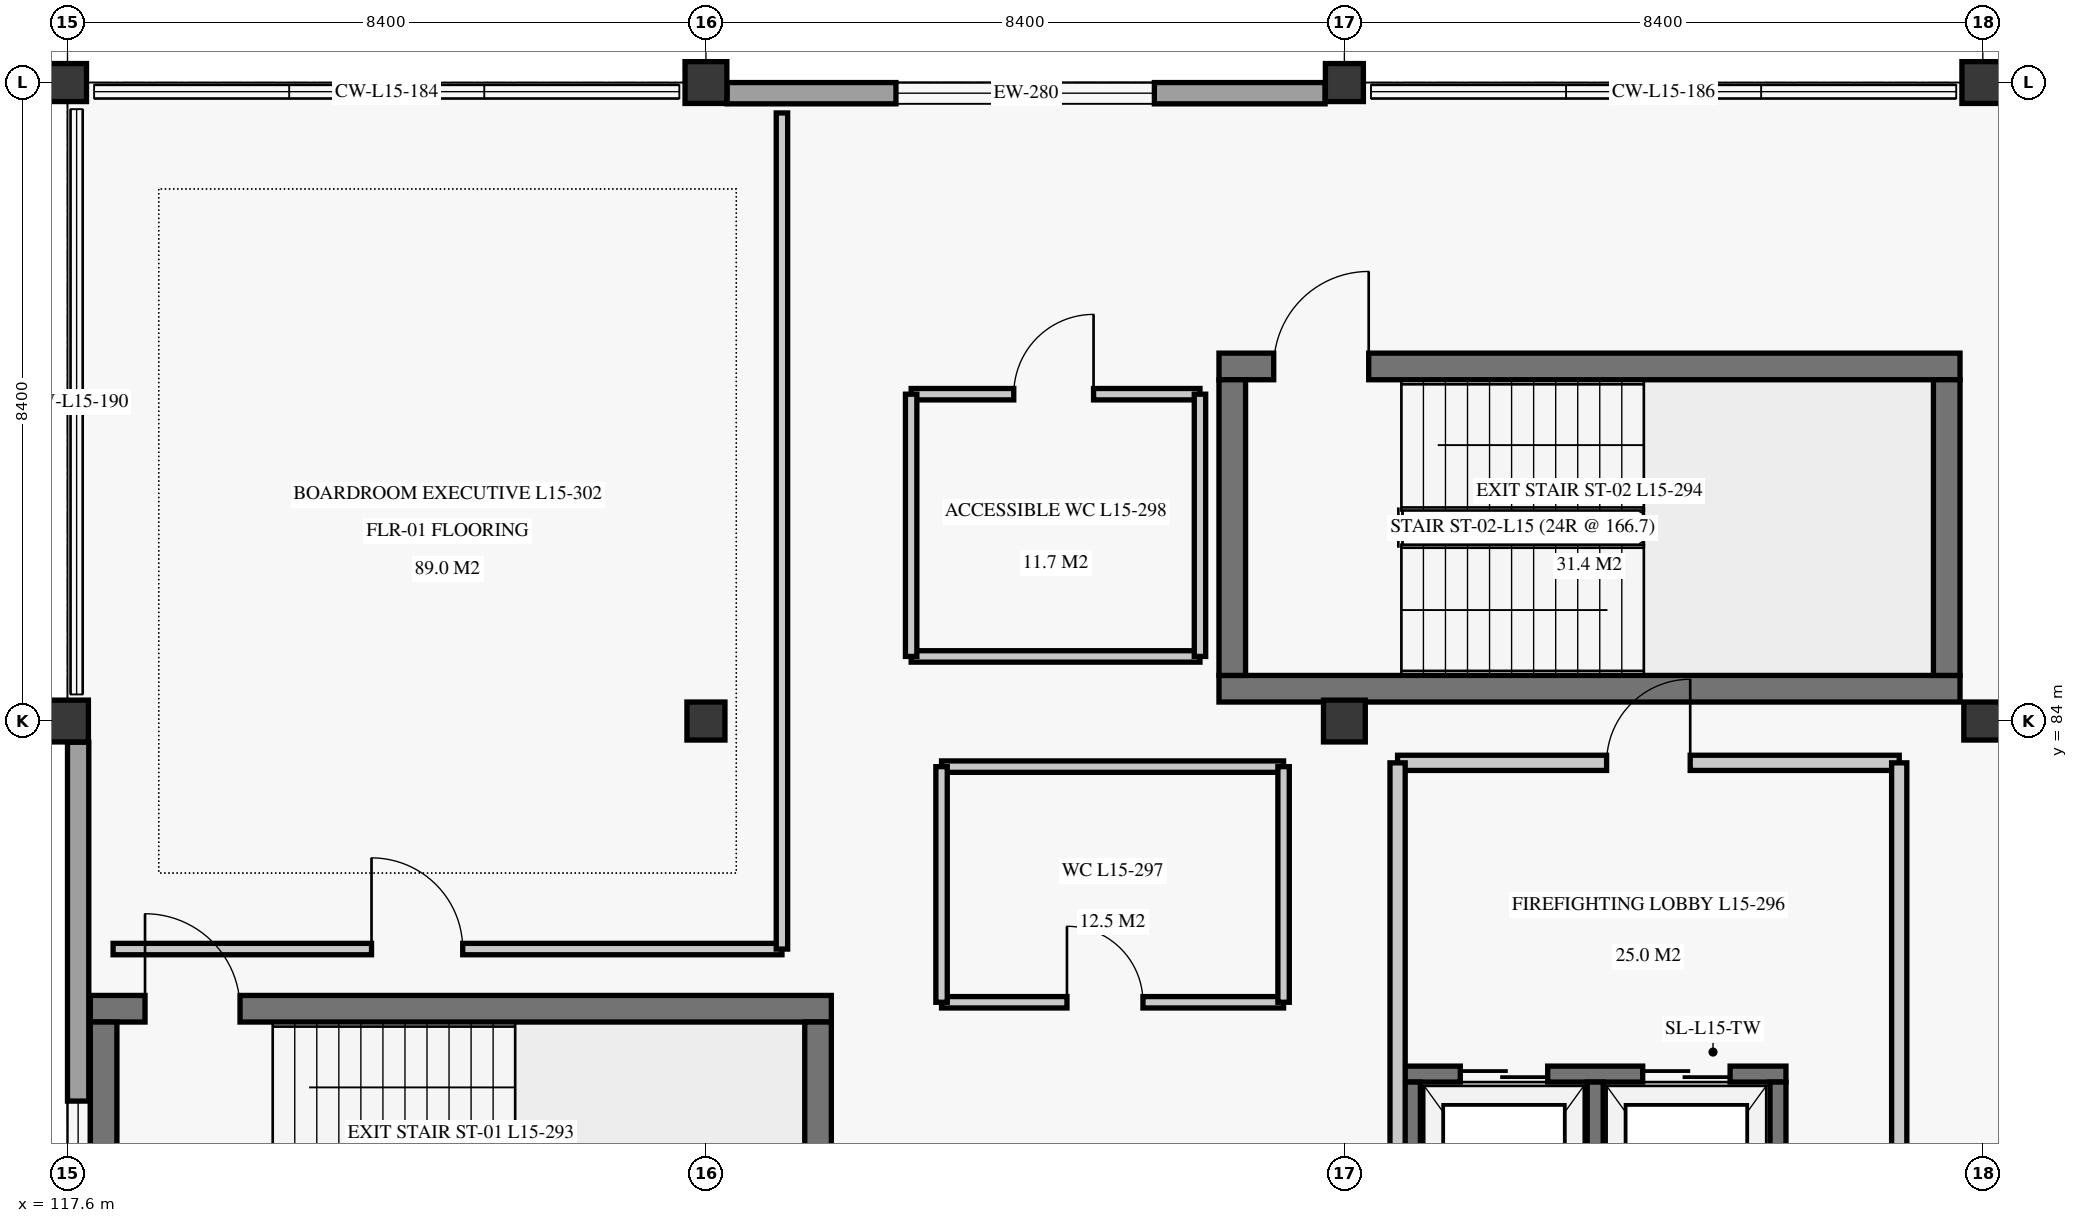
"""IFC4 building model, lengths in metres.
Left out: names, types, materials, properties, quantities, classifications, styles, units other than length and angle.
Written with IfcOpenShell. Run it as: python <this file> out.ifc"""

import sys

from ifc_helpers import new_model, si_unit, direction, frame, frame_2d, origin, origin_2d, place, context, subcontext, project, spatial, rectangle, extrude, element, fill, save


model = new_model("IFC4")
c1 = context("Model", 3, precision=1e-05, world=origin(), true_north=direction((0.0, 1.0)))
c2 = subcontext(c1, "Body", "Model", "MODEL_VIEW")
j1 = project(units=[si_unit("LENGTHUNIT", "METRE"), si_unit("PLANEANGLEUNIT", "RADIAN")], contexts=[c1])
p1 = place(None, origin())
s1 = spatial("IfcSite", under=j1, at=p1, CompositionType="ELEMENT")
p2 = place(p1, origin())
s2 = spatial("IfcBuilding", under=s1, at=p2, CompositionType="ELEMENT")
p3 = place(p2, frame((0.0, 0.0, 62.7)))
s3 = spatial("IfcBuildingStorey", under=s2, at=p3, CompositionType="ELEMENT", Elevation=62.7)
p4 = place(p3, frame((117.6, 84.0, 0.0), z_axis=(0.0, 0.0, 1.0), x_axis=(1.0, 0.0, 0.0)))
e1 = element("IfcColumn", 1, at=p4, inside=s3, PredefinedType="COLUMN", context=c2, shape_type="SweptSolid", body=[
    extrude(rectangle(XDim=0.55, YDim=0.55, at=origin_2d()), origin(), (0.0, 0.0, 1.0), 3.72),
])
for number, where, z_axis, x_axis in (
    (2, (117.6, 92.4, 0.0), (0.0, 0.0, 1.0), (1.0, 0.0, 0.0)),
    (3, (126.0, 84.0, 0.0), (0.0, 0.0, 1.0), (1.0, 0.0, 0.0)),
):
    element("IfcColumn", number, at=place(p3, frame(where, z_axis=z_axis, x_axis=x_axis)), inside=s3, PredefinedType="COLUMN", context=c2, shape_type="SweptSolid", body=[
        extrude(rectangle(XDim=0.5, YDim=0.5, at=origin_2d()), origin(), (0.0, 0.0, 1.0), 3.72),
    ])
for number, where, z_axis, x_axis in (
    (4, (126.0, 92.4, 0.0), (0.0, 0.0, 1.0), (1.0, 0.0, 0.0)),
    (5, (134.4, 84.0, 0.0), (0.0, 0.0, 1.0), (1.0, 0.0, 0.0)),
):
    element("IfcColumn", number, at=place(p3, frame(where, z_axis=z_axis, x_axis=x_axis)), inside=s3, PredefinedType="COLUMN", context=c2, shape_type="SweptSolid", body=[
        extrude(rectangle(XDim=0.55, YDim=0.55, at=origin_2d()), origin(), (0.0, 0.0, 1.0), 3.72),
    ])
for number, where, z_axis, x_axis in (
    (6, (134.4, 92.4, 0.0), (0.0, 0.0, 1.0), (1.0, 0.0, 0.0)),
    (7, (142.8, 84.0, 0.0), (0.0, 0.0, 1.0), (1.0, 0.0, 0.0)),
):
    element("IfcColumn", number, at=place(p3, frame(where, z_axis=z_axis, x_axis=x_axis)), inside=s3, PredefinedType="COLUMN", context=c2, shape_type="SweptSolid", body=[
        extrude(rectangle(XDim=0.5, YDim=0.5, at=origin_2d()), origin(), (0.0, 0.0, 1.0), 3.72),
    ])
p5 = place(p3, frame((142.8, 92.4, 0.0), z_axis=(0.0, 0.0, 1.0), x_axis=(1.0, 0.0, 0.0)))
e8 = element("IfcColumn", 8, at=p5, inside=s3, PredefinedType="COLUMN", context=c2, shape_type="SweptSolid", body=[
    extrude(rectangle(XDim=0.55, YDim=0.55, at=origin_2d()), origin(), (0.0, 0.0, 1.0), 3.72),
])
p6 = place(p3, frame((126.278, 92.26, 0.0), z_axis=(0.0, 0.0, 1.0), x_axis=(1.0, 0.0, 0.0)))
e9 = element("IfcWall", 9, at=p6, inside=s3, PredefinedType="SOLIDWALL", context=c2, shape_type="SweptSolid", body=[
    extrude(rectangle(XDim=7.868, YDim=0.28, at=frame_2d((3.934, 0.0))), origin(), (0.0, 0.0, 1.0), 3.04),
])
p7 = place(p6, frame((2.222, 0.0, 0.85)))
e10 = element("IfcOpeningElement", 10, at=p7, cuts=e9, PredefinedType="OPENING", context=c2, shape_type="SweptSolid", body=[
    extrude(rectangle(XDim=3.4, YDim=1.9, at=frame_2d((1.7, 0.95))), frame((0.0, 0.15, 0.0), z_axis=(0.0, -1.0, 0.0), x_axis=(1.0, 0.0, 0.0)), (0.0, 0.0, 1.0), 0.3),
])
p8 = place(p3, frame((117.74, 75.852, 0.0), z_axis=(0.0, 0.0, 1.0), x_axis=(0.0, 1.0, 0.0)))
e11 = element("IfcWall", 11, at=p8, inside=s3, PredefinedType="SOLIDWALL", context=c2, shape_type="SweptSolid", body=[
    extrude(rectangle(XDim=7.87, YDim=0.28, at=frame_2d((3.935, 0.0))), origin(), (0.0, 0.0, 1.0), 3.04),
])
p9 = place(p8, frame((0.948, 0.0, 0.85)))
e12 = element("IfcOpeningElement", 12, at=p9, cuts=e11, PredefinedType="OPENING", context=c2, shape_type="SweptSolid", body=[
    extrude(rectangle(XDim=2.2, YDim=1.8, at=frame_2d((1.1, 0.9))), frame((0.0, 0.15, 0.0), z_axis=(0.0, -1.0, 0.0), x_axis=(1.0, 0.0, 0.0)), (0.0, 0.0, 1.0), 0.3),
])
p10 = place(p3, frame((117.9, 80.215, 0.0), z_axis=(0.0, 0.0, 1.0), x_axis=(1.0, 0.0, 0.0)))
e13 = element("IfcWall", 13, at=p10, inside=s3, PredefinedType="SHEAR", context=c2, shape_type="SweptSolid", body=[
    extrude(rectangle(XDim=9.75, YDim=0.35, at=frame_2d((4.875, 0.0))), origin(), (0.0, 0.0, 1.0), 3.72),
])
p11 = place(p10, frame((0.72, 0.0, 0.0)))
e14 = element("IfcOpeningElement", 14, at=p11, cuts=e13, PredefinedType="OPENING", context=c2, shape_type="SweptSolid", body=[
    extrude(rectangle(XDim=1.25, YDim=2.2, at=frame_2d((0.625, 1.1))), frame((0.0, 0.185, 0.0), z_axis=(0.0, -1.0, 0.0), x_axis=(1.0, 0.0, 0.0)), (0.0, 0.0, 1.0), 0.37),
])
for number, where, z_axis, x_axis in (
    (15, (118.075, 76.15, 0.0), (0.0, 0.0, 1.0), (0.0, 1.0, 0.0)),
    (16, (127.475, 76.15, 0.0), (0.0, 0.0, 1.0), (0.0, 1.0, 0.0)),
):
    element("IfcWall", number, at=place(p3, frame(where, z_axis=z_axis, x_axis=x_axis)), inside=s3, PredefinedType="SHEAR", context=c2, shape_type="SweptSolid", body=[
        extrude(rectangle(XDim=3.89, YDim=0.35, at=frame_2d((1.945, 0.0))), origin(), (0.0, 0.0, 1.0), 3.72),
    ])
p12 = place(p3, frame((132.75, 84.425, 0.0), z_axis=(0.0, 0.0, 1.0), x_axis=(1.0, 0.0, 0.0)))
e17 = element("IfcWall", 17, at=p12, inside=s3, PredefinedType="SHEAR", context=c2, shape_type="SweptSolid", body=[
    extrude(rectangle(XDim=9.75, YDim=0.35, at=frame_2d((4.875, 0.0))), origin(), (0.0, 0.0, 1.0), 3.72),
])
p13 = place(p3, frame((132.75, 88.665, 0.0), z_axis=(0.0, 0.0, 1.0), x_axis=(1.0, 0.0, 0.0)))
e18 = element("IfcWall", 18, at=p13, inside=s3, PredefinedType="SHEAR", context=c2, shape_type="SweptSolid", body=[
    extrude(rectangle(XDim=9.75, YDim=0.35, at=frame_2d((4.875, 0.0))), origin(), (0.0, 0.0, 1.0), 3.72),
])
p14 = place(p13, frame((0.72, 0.0, 0.0)))
e19 = element("IfcOpeningElement", 19, at=p14, cuts=e18, PredefinedType="OPENING", context=c2, shape_type="SweptSolid", body=[
    extrude(rectangle(XDim=1.25, YDim=2.2, at=frame_2d((0.625, 1.1))), frame((0.0, 0.185, 0.0), z_axis=(0.0, -1.0, 0.0), x_axis=(1.0, 0.0, 0.0)), (0.0, 0.0, 1.0), 0.37),
])
for number, where, z_axis, x_axis in (
    (20, (132.925, 84.6, 0.0), (0.0, 0.0, 1.0), (0.0, 1.0, 0.0)),
    (21, (142.325, 84.6, 0.0), (0.0, 0.0, 1.0), (0.0, 1.0, 0.0)),
):
    element("IfcWall", number, at=place(p3, frame(where, z_axis=z_axis, x_axis=x_axis)), inside=s3, PredefinedType="SHEAR", context=c2, shape_type="SweptSolid", body=[
        extrude(rectangle(XDim=3.89, YDim=0.35, at=frame_2d((1.945, 0.0))), origin(), (0.0, 0.0, 1.0), 3.72),
    ])
p15 = place(p3, frame((135.19, 79.355, 0.0), z_axis=(0.0, 0.0, 1.0), x_axis=(1.0, 0.0, 0.0)))
e22 = element("IfcWall", 22, at=p15, inside=s3, PredefinedType="SHEAR", context=c2, shape_type="SweptSolid", body=[
    extrude(rectangle(XDim=5.02, YDim=0.21, at=frame_2d((2.51, 0.0))), origin(), (0.0, 0.0, 1.0), 3.72),
])
p16 = place(p15, frame((0.735, 0.0, 0.0)))
e23 = element("IfcOpeningElement", 23, at=p16, cuts=e22, PredefinedType="OPENING", context=c2, shape_type="SweptSolid", body=[
    extrude(rectangle(XDim=1.15, YDim=2.2, at=frame_2d((0.575, 1.1))), frame((0.0, 0.115, 0.0), z_axis=(0.0, -1.0, 0.0), x_axis=(1.0, 0.0, 0.0)), (0.0, 0.0, 1.0), 0.23),
])
p17 = place(p15, frame((3.135, 0.0, 0.0)))
e24 = element("IfcOpeningElement", 24, at=p17, cuts=e22, PredefinedType="OPENING", context=c2, shape_type="SweptSolid", body=[
    extrude(rectangle(XDim=1.15, YDim=2.2, at=frame_2d((0.575, 1.1))), frame((0.0, 0.115, 0.0), z_axis=(0.0, -1.0, 0.0), x_axis=(1.0, 0.0, 0.0)), (0.0, 0.0, 1.0), 0.23),
])
for number, where, z_axis, x_axis in (
    (25, (135.295, 76.25, 0.0), (0.0, 0.0, 1.0), (0.0, 1.0, 0.0)),
    (26, (140.105, 76.25, 0.0), (0.0, 0.0, 1.0), (0.0, 1.0, 0.0)),
    (27, (137.7, 76.25, 0.0), (0.0, 0.0, 1.0), (0.0, 1.0, 0.0)),
):
    element("IfcWall", number, at=place(p3, frame(where, z_axis=z_axis, x_axis=x_axis)), inside=s3, PredefinedType="SHEAR", context=c2, shape_type="SweptSolid", body=[
        extrude(rectangle(XDim=3.0, YDim=0.21, at=frame_2d((1.5, 0.0))), origin(), (0.0, 0.0, 1.0), 3.72),
    ])
p18 = place(p3, frame((135.1, 83.45, 0.0), z_axis=(0.0, 0.0, 1.0), x_axis=(1.0, 0.0, 0.0)))
e28 = element("IfcWall", 28, at=p18, inside=s3, PredefinedType="PARTITIONING", context=c2, shape_type="SweptSolid", body=[
    extrude(rectangle(XDim=6.6, YDim=0.2, at=frame_2d((3.3, 0.0))), origin(), (0.0, 0.0, 1.0), 3.34),
])
p19 = place(p18, frame((2.75, 0.0, 0.0)))
e29 = element("IfcOpeningElement", 29, at=p19, cuts=e28, PredefinedType="OPENING", context=c2, shape_type="SweptSolid", body=[
    extrude(rectangle(XDim=1.1, YDim=2.2, at=frame_2d((0.55, 1.1))), frame((0.0, 0.11, 0.0), z_axis=(0.0, -1.0, 0.0), x_axis=(1.0, 0.0, 0.0)), (0.0, 0.0, 1.0), 0.22),
])
for number, where, z_axis, x_axis in (
    (30, (135.1, 76.2, 0.0), (0.0, 0.0, 1.0), (0.0, 1.0, 0.0)),
    (31, (141.7, 76.2, 0.0), (0.0, 0.0, 1.0), (0.0, 1.0, 0.0)),
):
    element("IfcWall", number, at=place(p3, frame(where, z_axis=z_axis, x_axis=x_axis)), inside=s3, PredefinedType="PARTITIONING", context=c2, shape_type="SweptSolid", body=[
        extrude(rectangle(XDim=7.25, YDim=0.2, at=frame_2d((3.625, 0.0))), origin(), (0.0, 0.0, 1.0), 3.34),
    ])
p20 = place(p3, frame((129.1, 80.3, 0.0), z_axis=(0.0, 0.0, 1.0), x_axis=(1.0, 0.0, 0.0)))
e32 = element("IfcWall", 32, at=p20, inside=s3, PredefinedType="PARTITIONING", context=c2, shape_type="SweptSolid", body=[
    extrude(rectangle(XDim=4.5, YDim=0.15, at=frame_2d((2.25, 0.0))), origin(), (0.0, 0.0, 1.0), 3.34),
])
p21 = place(p20, frame((1.65, 0.0, 0.0)))
e33 = element("IfcOpeningElement", 33, at=p21, cuts=e32, PredefinedType="OPENING", context=c2, shape_type="SweptSolid", body=[
    extrude(rectangle(XDim=1.0, YDim=2.1, at=frame_2d((0.5, 1.05))), frame((0.0, 0.085, 0.0), z_axis=(0.0, -1.0, 0.0), x_axis=(1.0, 0.0, 0.0)), (0.0, 0.0, 1.0), 0.17),
])
p22 = place(p3, frame((129.1, 83.4, 0.0), z_axis=(0.0, 0.0, 1.0), x_axis=(1.0, 0.0, 0.0)))
e34 = element("IfcWall", 34, at=p22, inside=s3, PredefinedType="PARTITIONING", context=c2, shape_type="SweptSolid", body=[
    extrude(rectangle(XDim=4.5, YDim=0.15, at=frame_2d((2.25, 0.0))), origin(), (0.0, 0.0, 1.0), 3.34),
])
for number, where, z_axis, x_axis in (
    (35, (129.1, 80.3, 0.0), (0.0, 0.0, 1.0), (0.0, 1.0, 0.0)),
    (36, (133.6, 80.3, 0.0), (0.0, 0.0, 1.0), (0.0, 1.0, 0.0)),
):
    element("IfcWall", number, at=place(p3, frame(where, z_axis=z_axis, x_axis=x_axis)), inside=s3, PredefinedType="PARTITIONING", context=c2, shape_type="SweptSolid", body=[
        extrude(rectangle(XDim=3.1, YDim=0.15, at=frame_2d((1.55, 0.0))), origin(), (0.0, 0.0, 1.0), 3.34),
    ])
p23 = place(p3, frame((128.7, 88.3, 0.0), z_axis=(0.0, 0.0, 1.0), x_axis=(1.0, 0.0, 0.0)))
e37 = element("IfcWall", 37, at=p23, inside=s3, PredefinedType="PARTITIONING", context=c2, shape_type="SweptSolid", body=[
    extrude(rectangle(XDim=3.8, YDim=0.15, at=frame_2d((1.9, 0.0))), origin(), (0.0, 0.0, 1.0), 3.34),
])
p24 = place(p23, frame((1.35, 0.0, 0.0)))
e38 = element("IfcOpeningElement", 38, at=p24, cuts=e37, PredefinedType="OPENING", context=c2, shape_type="SweptSolid", body=[
    extrude(rectangle(XDim=1.05, YDim=2.15, at=frame_2d((0.525, 1.075))), frame((0.0, 0.085, 0.0), z_axis=(0.0, -1.0, 0.0), x_axis=(1.0, 0.0, 0.0)), (0.0, 0.0, 1.0), 0.17),
])
p25 = place(p3, frame((128.7, 84.85, 0.0), z_axis=(0.0, 0.0, 1.0), x_axis=(1.0, 0.0, 0.0)))
e39 = element("IfcWall", 39, at=p25, inside=s3, PredefinedType="PARTITIONING", context=c2, shape_type="SweptSolid", body=[
    extrude(rectangle(XDim=3.8, YDim=0.15, at=frame_2d((1.9, 0.0))), origin(), (0.0, 0.0, 1.0), 3.34),
])
for number, where, z_axis, x_axis in (
    (40, (128.7, 84.85, 0.0), (0.0, 0.0, 1.0), (0.0, 1.0, 0.0)),
    (41, (132.5, 84.85, 0.0), (0.0, 0.0, 1.0), (0.0, 1.0, 0.0)),
):
    element("IfcWall", number, at=place(p3, frame(where, z_axis=z_axis, x_axis=x_axis)), inside=s3, PredefinedType="PARTITIONING", context=c2, shape_type="SweptSolid", body=[
        extrude(rectangle(XDim=3.45, YDim=0.15, at=frame_2d((1.725, 0.0))), origin(), (0.0, 0.0, 1.0), 3.34),
    ])
p26 = place(p3, frame((118.2, 81.0, 0.0), z_axis=(0.0, 0.0, 1.0), x_axis=(1.0, 0.0, 0.0)))
e42 = element("IfcWall", 42, at=p26, inside=s3, PredefinedType="PARTITIONING", context=c2, shape_type="SweptSolid", body=[
    extrude(rectangle(XDim=8.8, YDim=0.15, at=frame_2d((4.4, 0.0))), origin(), (0.0, 0.0, 1.0), 3.34),
])
p27 = place(p26, frame((3.4, 0.0, 0.0)))
e43 = element("IfcOpeningElement", 43, at=p27, cuts=e42, PredefinedType="OPENING", context=c2, shape_type="SweptSolid", body=[
    extrude(rectangle(XDim=1.2, YDim=2.3, at=frame_2d((0.6, 1.15))), frame((0.0, 0.085, 0.0), z_axis=(0.0, -1.0, 0.0), x_axis=(1.0, 0.0, 0.0)), (0.0, 0.0, 1.0), 0.17),
])
p28 = place(p3, frame((127.0, 81.0, 0.0), z_axis=(0.0, 0.0, 1.0), x_axis=(0.0, 1.0, 0.0)))
e44 = element("IfcWall", 44, at=p28, inside=s3, PredefinedType="PARTITIONING", context=c2, shape_type="SweptSolid", body=[
    extrude(rectangle(XDim=11.0, YDim=0.15, at=frame_2d((5.5, 0.0))), origin(), (0.0, 0.0, 1.0), 3.34),
])
p29 = place(p7, origin())
e45 = element("IfcWindow", 45, at=p29, inside=s3, PartitioningType="SINGLE_PANEL", PredefinedType="WINDOW", context=c2, shape_type="SweptSolid", body=[
    extrude(rectangle(XDim=3.4, YDim=1.9, at=frame_2d((1.7, 0.95))), frame((0.0, 0.03, 0.0), z_axis=(0.0, -1.0, 0.0), x_axis=(1.0, 0.0, 0.0)), (0.0, 0.0, 1.0), 0.06),
])
fill(e10, e45)
p30 = place(p9, origin())
e46 = element("IfcWindow", 46, at=p30, inside=s3, PartitioningType="SINGLE_PANEL", PredefinedType="WINDOW", context=c2, shape_type="SweptSolid", body=[
    extrude(rectangle(XDim=2.2, YDim=1.8, at=frame_2d((1.1, 0.9))), frame((0.0, 0.03, 0.0), z_axis=(0.0, -1.0, 0.0), x_axis=(1.0, 0.0, 0.0)), (0.0, 0.0, 1.0), 0.06),
])
fill(e12, e46)
p31 = place(p11, origin())
e47 = element("IfcDoor", 47, at=p31, inside=s3, OperationType="SINGLE_SWING_LEFT", PredefinedType="DOOR", context=c2, shape_type="SweptSolid", body=[
    extrude(rectangle(XDim=1.25, YDim=2.2, at=frame_2d((0.625, 1.1))), frame((0.0, 0.025, 0.0), z_axis=(0.0, -1.0, 0.0), x_axis=(1.0, 0.0, 0.0)), (0.0, 0.0, 1.0), 0.05),
])
fill(e14, e47)
p32 = place(p14, origin())
e48 = element("IfcDoor", 48, at=p32, inside=s3, OperationType="SINGLE_SWING_RIGHT", PredefinedType="DOOR", context=c2, shape_type="SweptSolid", body=[
    extrude(rectangle(XDim=1.25, YDim=2.2, at=frame_2d((0.625, 1.1))), frame((0.0, 0.025, 0.0), z_axis=(0.0, -1.0, 0.0), x_axis=(1.0, 0.0, 0.0)), (0.0, 0.0, 1.0), 0.05),
])
fill(e19, e48)
p33 = place(p16, origin())
e49 = element("IfcDoor", 49, at=p33, inside=s3, OperationType="DOUBLE_DOOR_SLIDING", PredefinedType="DOOR", context=c2, shape_type="SweptSolid", body=[
    extrude(rectangle(XDim=1.15, YDim=2.2, at=frame_2d((0.575, 1.1))), frame((0.0, 0.025, 0.0), z_axis=(0.0, -1.0, 0.0), x_axis=(1.0, 0.0, 0.0)), (0.0, 0.0, 1.0), 0.05),
])
fill(e23, e49)
p34 = place(p17, origin())
e50 = element("IfcDoor", 50, at=p34, inside=s3, OperationType="DOUBLE_DOOR_SLIDING", PredefinedType="DOOR", context=c2, shape_type="SweptSolid", body=[
    extrude(rectangle(XDim=1.15, YDim=2.2, at=frame_2d((0.575, 1.1))), frame((0.0, 0.025, 0.0), z_axis=(0.0, -1.0, 0.0), x_axis=(1.0, 0.0, 0.0)), (0.0, 0.0, 1.0), 0.05),
])
fill(e24, e50)
p35 = place(p19, origin())
e51 = element("IfcDoor", 51, at=p35, inside=s3, OperationType="SINGLE_SWING_RIGHT", PredefinedType="DOOR", context=c2, shape_type="SweptSolid", body=[
    extrude(rectangle(XDim=1.1, YDim=2.2, at=frame_2d((0.55, 1.1))), frame((0.0, 0.025, 0.0), z_axis=(0.0, -1.0, 0.0), x_axis=(1.0, 0.0, 0.0)), (0.0, 0.0, 1.0), 0.05),
])
fill(e29, e51)
p36 = place(p21, origin())
e52 = element("IfcDoor", 52, at=p36, inside=s3, OperationType="SINGLE_SWING_LEFT", PredefinedType="DOOR", context=c2, shape_type="SweptSolid", body=[
    extrude(rectangle(XDim=1.0, YDim=2.1, at=frame_2d((0.5, 1.05))), frame((0.0, 0.025, 0.0), z_axis=(0.0, -1.0, 0.0), x_axis=(1.0, 0.0, 0.0)), (0.0, 0.0, 1.0), 0.05),
])
fill(e33, e52)
p37 = place(p24, origin())
e53 = element("IfcDoor", 53, at=p37, inside=s3, OperationType="SINGLE_SWING_RIGHT", PredefinedType="DOOR", context=c2, shape_type="SweptSolid", body=[
    extrude(rectangle(XDim=1.05, YDim=2.15, at=frame_2d((0.525, 1.075))), frame((0.0, 0.025, 0.0), z_axis=(0.0, -1.0, 0.0), x_axis=(1.0, 0.0, 0.0)), (0.0, 0.0, 1.0), 0.05),
])
fill(e38, e53)
p38 = place(p27, origin())
e54 = element("IfcDoor", 54, at=p38, inside=s3, OperationType="SINGLE_SWING_LEFT", PredefinedType="DOOR", context=c2, shape_type="SweptSolid", body=[
    extrude(rectangle(XDim=1.2, YDim=2.3, at=frame_2d((0.6, 1.15))), frame((0.0, 0.025, 0.0), z_axis=(0.0, -1.0, 0.0), x_axis=(1.0, 0.0, 0.0)), (0.0, 0.0, 1.0), 0.05),
])
fill(e43, e54)
save(model, sys.argv[1])
